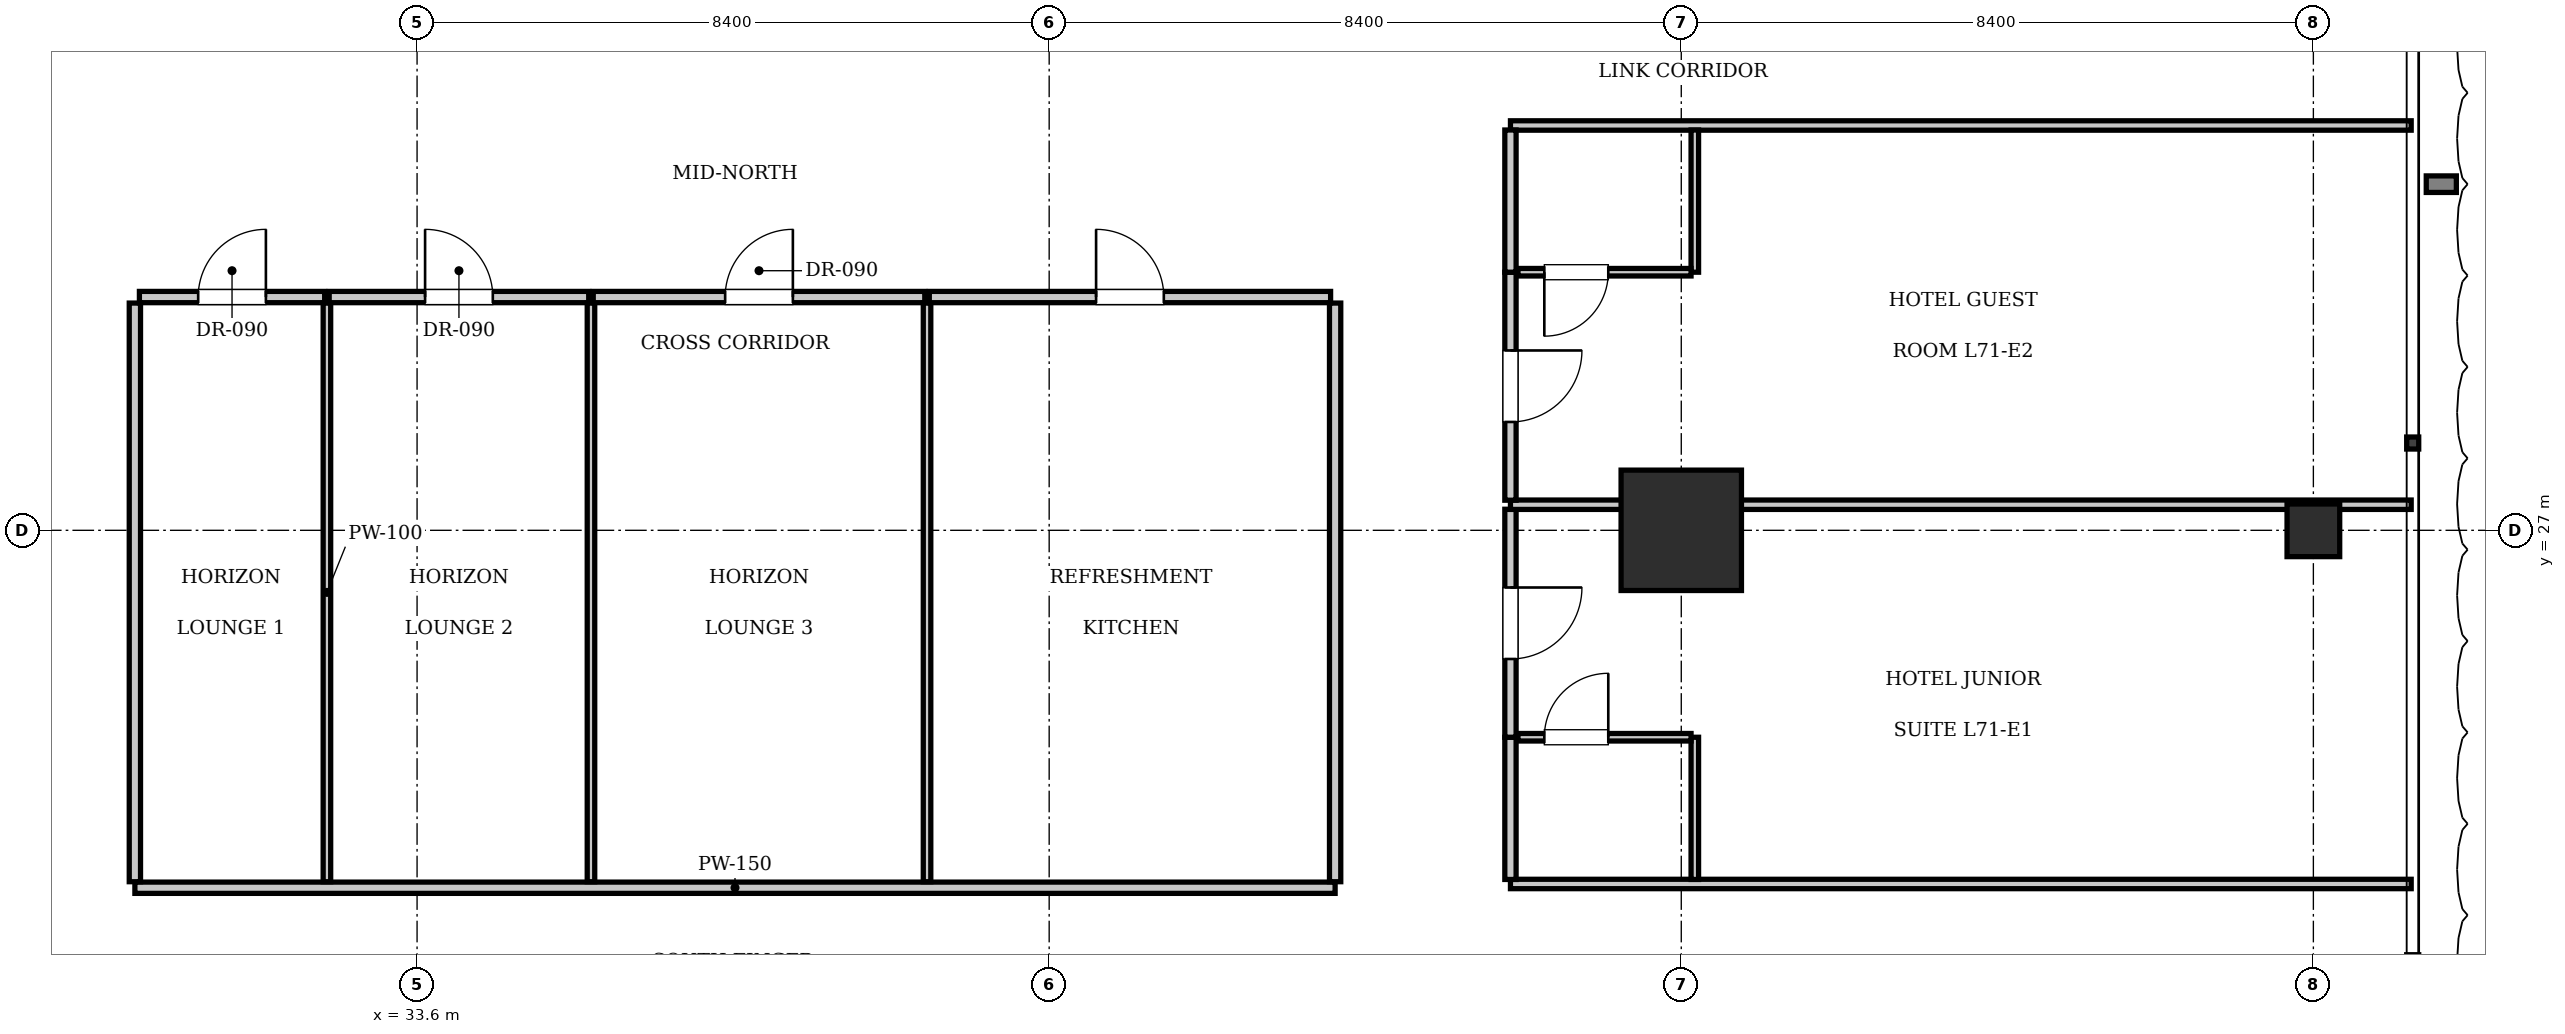
"""IFC4 building model, lengths in metres.
Left out: names, types, materials, properties, quantities, classifications, styles, units other than length and angle.
Written with IfcOpenShell. Run it as: python <this file> out.ifc"""

import sys

from ifc_helpers import new_model, si_unit, direction, frame, frame_2d, origin, origin_2d, place, context, subcontext, project, spatial, rectangle, extrude, element, fill, save


model = new_model("IFC4")
c1 = context("Model", 3, precision=1e-05, world=origin(), true_north=direction((0.0, 1.0)))
c2 = subcontext(c1, "Body", "Model", "MODEL_VIEW")
j1 = project(units=[si_unit("LENGTHUNIT", "METRE"), si_unit("PLANEANGLEUNIT", "RADIAN")], contexts=[c1])
p1 = place(None, origin())
s1 = spatial("IfcSite", under=j1, at=p1, CompositionType="ELEMENT")
p2 = place(p1, origin())
s2 = spatial("IfcBuilding", under=s1, at=p2, CompositionType="ELEMENT")
p3 = place(p2, frame((0.0, 0.0, 289.45)))
s3 = spatial("IfcBuildingStorey", under=s2, at=p3, CompositionType="ELEMENT", Elevation=289.45)
p4 = place(p3, frame((50.4, 27.0, 0.0), z_axis=(0.0, 0.0, 1.0), x_axis=(1.0, 0.0, 0.0)))
e1 = element("IfcColumn", 1, at=p4, inside=s3, PredefinedType="COLUMN", context=c2, shape_type="SweptSolid", body=[
    extrude(rectangle(XDim=1.6, YDim=1.6, at=origin_2d()), origin(), (0.0, 0.0, 1.0), 3.85),
])
p5 = place(p3, frame((58.8, 27.0, 0.0), z_axis=(0.0, 0.0, 1.0), x_axis=(1.0, 0.0, 0.0)))
e2 = element("IfcColumn", 2, at=p5, inside=s3, PredefinedType="COLUMN", context=c2, shape_type="SweptSolid", body=[
    extrude(rectangle(XDim=0.7, YDim=0.7, at=origin_2d()), origin(), (0.0, 0.0, 1.0), 3.85),
])
p6 = place(p3, frame((29.85, 22.25, 0.0), z_axis=(0.0, 0.0, 1.0), x_axis=(1.0, 0.0, 0.0)))
e3 = element("IfcWall", 3, at=p6, inside=s3, PredefinedType="PARTITIONING", context=c2, shape_type="SweptSolid", body=[
    extrude(rectangle(XDim=15.95, YDim=0.15, at=frame_2d((7.975, 0.0))), origin(), (0.0, 0.0, 1.0), 3.61),
])
for number, where, z_axis, x_axis in (
    (4, (29.85, 22.33, 0.0), (0.0, 0.0, 1.0), (0.0, 1.0, 0.0)),
    (5, (45.8, 22.33, 0.0), (0.0, 0.0, 1.0), (0.0, 1.0, 0.0)),
):
    element("IfcWall", number, at=place(p3, frame(where, z_axis=z_axis, x_axis=x_axis)), inside=s3, PredefinedType="PARTITIONING", context=c2, shape_type="SweptSolid", body=[
        extrude(rectangle(XDim=7.69, YDim=0.15, at=frame_2d((3.845, 0.0))), origin(), (0.0, 0.0, 1.0), 3.61),
    ])
p7 = place(p3, frame((29.91, 30.1, 0.0), z_axis=(0.0, 0.0, 1.0), x_axis=(1.0, 0.0, 0.0)))
e6 = element("IfcWall", 6, at=p7, inside=s3, PredefinedType="PARTITIONING", context=c2, shape_type="SweptSolid", body=[
    extrude(rectangle(XDim=2.462, YDim=0.15, at=frame_2d((1.231, 0.0))), origin(), (0.0, 0.0, 1.0), 3.61),
])
p8 = place(p7, frame((0.781, 0.0, 0.0)))
e7 = element("IfcOpeningElement", 7, at=p8, cuts=e6, PredefinedType="OPENING", context=c2, shape_type="SweptSolid", body=[
    extrude(rectangle(XDim=0.9, YDim=2.1, at=frame_2d((0.45, 1.05))), frame((0.0, 0.085, 0.0), z_axis=(0.0, -1.0, 0.0), x_axis=(1.0, 0.0, 0.0)), (0.0, 0.0, 1.0), 0.17),
])
p9 = place(p3, frame((32.402, 22.33, 0.0), z_axis=(0.0, 0.0, 1.0), x_axis=(0.0, 1.0, 0.0)))
e8 = element("IfcWall", 8, at=p9, inside=s3, PredefinedType="PARTITIONING", context=c2, shape_type="SweptSolid", body=[
    extrude(rectangle(XDim=7.69, YDim=0.1, at=frame_2d((3.845, 0.0))), origin(), (0.0, 0.0, 1.0), 3.61),
])
p10 = place(p3, frame((32.432, 30.1, 0.0), z_axis=(0.0, 0.0, 1.0), x_axis=(1.0, 0.0, 0.0)))
e9 = element("IfcWall", 9, at=p10, inside=s3, PredefinedType="PARTITIONING", context=c2, shape_type="SweptSolid", body=[
    extrude(rectangle(XDim=3.449, YDim=0.15, at=frame_2d((1.725, 0.0))), origin(), (0.0, 0.0, 1.0), 3.61),
])
p11 = place(p10, frame((1.274, 0.0, 0.0)))
e10 = element("IfcOpeningElement", 10, at=p11, cuts=e9, PredefinedType="OPENING", context=c2, shape_type="SweptSolid", body=[
    extrude(rectangle(XDim=0.9, YDim=2.1, at=frame_2d((0.45, 1.05))), frame((0.0, 0.085, 0.0), z_axis=(0.0, -1.0, 0.0), x_axis=(1.0, 0.0, 0.0)), (0.0, 0.0, 1.0), 0.17),
])
p12 = place(p3, frame((35.911, 22.33, 0.0), z_axis=(0.0, 0.0, 1.0), x_axis=(0.0, 1.0, 0.0)))
e11 = element("IfcWall", 11, at=p12, inside=s3, PredefinedType="PARTITIONING", context=c2, shape_type="SweptSolid", body=[
    extrude(rectangle(XDim=7.69, YDim=0.1, at=frame_2d((3.845, 0.0))), origin(), (0.0, 0.0, 1.0), 3.61),
])
p13 = place(p3, frame((35.941, 30.1, 0.0), z_axis=(0.0, 0.0, 1.0), x_axis=(1.0, 0.0, 0.0)))
e12 = element("IfcWall", 12, at=p13, inside=s3, PredefinedType="PARTITIONING", context=c2, shape_type="SweptSolid", body=[
    extrude(rectangle(XDim=4.406, YDim=0.15, at=frame_2d((2.203, 0.0))), origin(), (0.0, 0.0, 1.0), 3.61),
])
p14 = place(p13, frame((1.753, 0.0, 0.0)))
e13 = element("IfcOpeningElement", 13, at=p14, cuts=e12, PredefinedType="OPENING", context=c2, shape_type="SweptSolid", body=[
    extrude(rectangle(XDim=0.9, YDim=2.1, at=frame_2d((0.45, 1.05))), frame((0.0, 0.085, 0.0), z_axis=(0.0, -1.0, 0.0), x_axis=(1.0, 0.0, 0.0)), (0.0, 0.0, 1.0), 0.17),
])
p15 = place(p3, frame((40.377, 22.33, 0.0), z_axis=(0.0, 0.0, 1.0), x_axis=(0.0, 1.0, 0.0)))
e14 = element("IfcWall", 14, at=p15, inside=s3, PredefinedType="PARTITIONING", context=c2, shape_type="SweptSolid", body=[
    extrude(rectangle(XDim=7.69, YDim=0.1, at=frame_2d((3.845, 0.0))), origin(), (0.0, 0.0, 1.0), 3.61),
])
p16 = place(p3, frame((40.407, 30.1, 0.0), z_axis=(0.0, 0.0, 1.0), x_axis=(1.0, 0.0, 0.0)))
e15 = element("IfcWall", 15, at=p16, inside=s3, PredefinedType="PARTITIONING", context=c2, shape_type="SweptSolid", body=[
    extrude(rectangle(XDim=5.333, YDim=0.15, at=frame_2d((2.667, 0.0))), origin(), (0.0, 0.0, 1.0), 3.61),
])
p17 = place(p16, frame((2.217, 0.0, 0.0)))
e16 = element("IfcOpeningElement", 16, at=p17, cuts=e15, PredefinedType="OPENING", context=c2, shape_type="SweptSolid", body=[
    extrude(rectangle(XDim=0.9, YDim=2.1, at=frame_2d((0.45, 1.05))), frame((0.0, 0.085, 0.0), z_axis=(0.0, -1.0, 0.0), x_axis=(1.0, 0.0, 0.0)), (0.0, 0.0, 1.0), 0.17),
])
for number, where, z_axis, x_axis in (
    (17, (48.13, 22.3, 0.0), (0.0, 0.0, 1.0), (1.0, 0.0, 0.0)),
    (18, (48.13, 32.38, 0.0), (0.0, 0.0, 1.0), (1.0, 0.0, 0.0)),
):
    element("IfcWall", number, at=place(p3, frame(where, z_axis=z_axis, x_axis=x_axis)), inside=s3, PredefinedType="PARTITIONING", context=c2, shape_type="SweptSolid", body=[
        extrude(rectangle(XDim=11.97, YDim=0.125, at=frame_2d((5.985, 0.0))), origin(), (0.0, 0.0, 1.0), 3.61),
    ])
p18 = place(p3, frame((48.13, 22.36, 0.0), z_axis=(0.0, 0.0, 1.0), x_axis=(0.0, 1.0, 0.0)))
e19 = element("IfcWall", 19, at=p18, inside=s3, PredefinedType="PARTITIONING", context=c2, shape_type="SweptSolid", body=[
    extrude(rectangle(XDim=1.89, YDim=0.15, at=frame_2d((0.945, 0.0))), origin(), (0.0, 0.0, 1.0), 3.61),
])
p19 = place(p3, frame((48.13, 24.25, 0.0), z_axis=(0.0, 0.0, 1.0), x_axis=(0.0, 1.0, 0.0)))
e20 = element("IfcWall", 20, at=p19, inside=s3, PredefinedType="PARTITIONING", context=c2, shape_type="SweptSolid", body=[
    extrude(rectangle(XDim=3.03, YDim=0.15, at=frame_2d((1.515, 0.0))), origin(), (0.0, 0.0, 1.0), 3.61),
])
p20 = place(p19, frame((1.04, 0.0, 0.0)))
e21 = element("IfcOpeningElement", 21, at=p20, cuts=e20, PredefinedType="OPENING", context=c2, shape_type="SweptSolid", body=[
    extrude(rectangle(XDim=0.95, YDim=2.15, at=frame_2d((0.475, 1.075))), frame((0.0, 0.085, 0.0), z_axis=(0.0, -1.0, 0.0), x_axis=(1.0, 0.0, 0.0)), (0.0, 0.0, 1.0), 0.17),
])
p21 = place(p3, frame((50.58, 22.36, 0.0), z_axis=(0.0, 0.0, 1.0), x_axis=(0.0, 1.0, 0.0)))
e22 = element("IfcWall", 22, at=p21, inside=s3, PredefinedType="PARTITIONING", context=c2, shape_type="SweptSolid", body=[
    extrude(rectangle(XDim=1.89, YDim=0.1, at=frame_2d((0.945, 0.0))), origin(), (0.0, 0.0, 1.0), 3.61),
])
p22 = place(p3, frame((48.23, 24.25, 0.0), z_axis=(0.0, 0.0, 1.0), x_axis=(1.0, 0.0, 0.0)))
e23 = element("IfcWall", 23, at=p22, inside=s3, PredefinedType="PARTITIONING", context=c2, shape_type="SweptSolid", body=[
    extrude(rectangle(XDim=2.3, YDim=0.1, at=frame_2d((1.15, 0.0))), origin(), (0.0, 0.0, 1.0), 3.61),
])
p23 = place(p22, frame((0.35, 0.0, 0.0)))
e24 = element("IfcOpeningElement", 24, at=p23, cuts=e23, PredefinedType="OPENING", context=c2, shape_type="SweptSolid", body=[
    extrude(rectangle(XDim=0.85, YDim=2.1, at=frame_2d((0.425, 1.05))), frame((0.0, 0.06, 0.0), z_axis=(0.0, -1.0, 0.0), x_axis=(1.0, 0.0, 0.0)), (0.0, 0.0, 1.0), 0.12),
])
p24 = place(p3, frame((48.13, 27.34, 0.0), z_axis=(0.0, 0.0, 1.0), x_axis=(1.0, 0.0, 0.0)))
e25 = element("IfcWall", 25, at=p24, inside=s3, PredefinedType="PARTITIONING", context=c2, shape_type="SweptSolid", body=[
    extrude(rectangle(XDim=11.97, YDim=0.125, at=frame_2d((5.985, 0.0))), origin(), (0.0, 0.0, 1.0), 3.61),
])
p25 = place(p3, frame((48.13, 27.4, 0.0), z_axis=(0.0, 0.0, 1.0), x_axis=(0.0, 1.0, 0.0)))
e26 = element("IfcWall", 26, at=p25, inside=s3, PredefinedType="PARTITIONING", context=c2, shape_type="SweptSolid", body=[
    extrude(rectangle(XDim=3.03, YDim=0.15, at=frame_2d((1.515, 0.0))), origin(), (0.0, 0.0, 1.0), 3.61),
])
p26 = place(p25, frame((1.04, 0.0, 0.0)))
e27 = element("IfcOpeningElement", 27, at=p26, cuts=e26, PredefinedType="OPENING", context=c2, shape_type="SweptSolid", body=[
    extrude(rectangle(XDim=0.95, YDim=2.15, at=frame_2d((0.475, 1.075))), frame((0.0, 0.085, 0.0), z_axis=(0.0, -1.0, 0.0), x_axis=(1.0, 0.0, 0.0)), (0.0, 0.0, 1.0), 0.17),
])
p27 = place(p3, frame((48.13, 30.43, 0.0), z_axis=(0.0, 0.0, 1.0), x_axis=(0.0, 1.0, 0.0)))
e28 = element("IfcWall", 28, at=p27, inside=s3, PredefinedType="PARTITIONING", context=c2, shape_type="SweptSolid", body=[
    extrude(rectangle(XDim=1.89, YDim=0.15, at=frame_2d((0.945, 0.0))), origin(), (0.0, 0.0, 1.0), 3.61),
])
p28 = place(p3, frame((50.58, 30.43, 0.0), z_axis=(0.0, 0.0, 1.0), x_axis=(0.0, 1.0, 0.0)))
e29 = element("IfcWall", 29, at=p28, inside=s3, PredefinedType="PARTITIONING", context=c2, shape_type="SweptSolid", body=[
    extrude(rectangle(XDim=1.89, YDim=0.1, at=frame_2d((0.945, 0.0))), origin(), (0.0, 0.0, 1.0), 3.61),
])
p29 = place(p3, frame((48.23, 30.43, 0.0), z_axis=(0.0, 0.0, 1.0), x_axis=(1.0, 0.0, 0.0)))
e30 = element("IfcWall", 30, at=p29, inside=s3, PredefinedType="PARTITIONING", context=c2, shape_type="SweptSolid", body=[
    extrude(rectangle(XDim=2.3, YDim=0.1, at=frame_2d((1.15, 0.0))), origin(), (0.0, 0.0, 1.0), 3.61),
])
p30 = place(p29, frame((0.35, 0.0, 0.0)))
e31 = element("IfcOpeningElement", 31, at=p30, cuts=e30, PredefinedType="OPENING", context=c2, shape_type="SweptSolid", body=[
    extrude(rectangle(XDim=0.85, YDim=2.1, at=frame_2d((0.425, 1.05))), frame((0.0, 0.06, 0.0), z_axis=(0.0, -1.0, 0.0), x_axis=(1.0, 0.0, 0.0)), (0.0, 0.0, 1.0), 0.12),
])
p31 = place(p8, origin())
e32 = element("IfcDoor", 32, at=p31, inside=s3, OperationType="SINGLE_SWING_RIGHT", PredefinedType="DOOR", context=c2, shape_type="SweptSolid", body=[
    extrude(rectangle(XDim=0.9, YDim=2.1, at=frame_2d((0.45, 1.05))), frame((0.0, 0.025, 0.0), z_axis=(0.0, -1.0, 0.0), x_axis=(1.0, 0.0, 0.0)), (0.0, 0.0, 1.0), 0.05),
])
fill(e7, e32)
p32 = place(p11, origin())
e33 = element("IfcDoor", 33, at=p32, inside=s3, OperationType="SINGLE_SWING_LEFT", PredefinedType="DOOR", context=c2, shape_type="SweptSolid", body=[
    extrude(rectangle(XDim=0.9, YDim=2.1, at=frame_2d((0.45, 1.05))), frame((0.0, 0.025, 0.0), z_axis=(0.0, -1.0, 0.0), x_axis=(1.0, 0.0, 0.0)), (0.0, 0.0, 1.0), 0.05),
])
fill(e10, e33)
p33 = place(p14, origin())
e34 = element("IfcDoor", 34, at=p33, inside=s3, OperationType="SINGLE_SWING_RIGHT", PredefinedType="DOOR", context=c2, shape_type="SweptSolid", body=[
    extrude(rectangle(XDim=0.9, YDim=2.1, at=frame_2d((0.45, 1.05))), frame((0.0, 0.025, 0.0), z_axis=(0.0, -1.0, 0.0), x_axis=(1.0, 0.0, 0.0)), (0.0, 0.0, 1.0), 0.05),
])
fill(e13, e34)
p34 = place(p17, origin())
e35 = element("IfcDoor", 35, at=p34, inside=s3, OperationType="SINGLE_SWING_LEFT", PredefinedType="DOOR", context=c2, shape_type="SweptSolid", body=[
    extrude(rectangle(XDim=0.9, YDim=2.1, at=frame_2d((0.45, 1.05))), frame((0.0, 0.025, 0.0), z_axis=(0.0, -1.0, 0.0), x_axis=(1.0, 0.0, 0.0)), (0.0, 0.0, 1.0), 0.05),
])
fill(e16, e35)
p35 = place(p23, origin())
e36 = element("IfcDoor", 36, at=p35, inside=s3, OperationType="SINGLE_SWING_RIGHT", PredefinedType="DOOR", context=c2, shape_type="SweptSolid", body=[
    extrude(rectangle(XDim=0.85, YDim=2.1, at=frame_2d((0.425, 1.05))), frame((0.0, 0.025, 0.0), z_axis=(0.0, -1.0, 0.0), x_axis=(1.0, 0.0, 0.0)), (0.0, 0.0, 1.0), 0.05),
])
fill(e24, e36)
p36 = place(p20, frame((0.95, 0.0, 0.0), z_axis=(0.0, 0.0, 1.0), x_axis=(-1.0, 0.0, 0.0)))
e37 = element("IfcDoor", 37, at=p36, inside=s3, OperationType="SINGLE_SWING_LEFT", PredefinedType="DOOR", context=c2, shape_type="SweptSolid", body=[
    extrude(rectangle(XDim=0.95, YDim=2.15, at=frame_2d((0.475, 1.075))), frame((0.0, 0.025, 0.0), z_axis=(0.0, -1.0, 0.0), x_axis=(1.0, 0.0, 0.0)), (0.0, 0.0, 1.0), 0.05),
])
fill(e21, e37)
p37 = place(p30, frame((0.85, 0.0, 0.0), z_axis=(0.0, 0.0, 1.0), x_axis=(-1.0, 0.0, 0.0)))
e38 = element("IfcDoor", 38, at=p37, inside=s3, OperationType="SINGLE_SWING_RIGHT", PredefinedType="DOOR", context=c2, shape_type="SweptSolid", body=[
    extrude(rectangle(XDim=0.85, YDim=2.1, at=frame_2d((0.425, 1.05))), frame((0.0, 0.025, 0.0), z_axis=(0.0, -1.0, 0.0), x_axis=(1.0, 0.0, 0.0)), (0.0, 0.0, 1.0), 0.05),
])
fill(e31, e38)
p38 = place(p26, frame((0.95, 0.0, 0.0), z_axis=(0.0, 0.0, 1.0), x_axis=(-1.0, 0.0, 0.0)))
e39 = element("IfcDoor", 39, at=p38, inside=s3, OperationType="SINGLE_SWING_LEFT", PredefinedType="DOOR", context=c2, shape_type="SweptSolid", body=[
    extrude(rectangle(XDim=0.95, YDim=2.15, at=frame_2d((0.475, 1.075))), frame((0.0, 0.025, 0.0), z_axis=(0.0, -1.0, 0.0), x_axis=(1.0, 0.0, 0.0)), (0.0, 0.0, 1.0), 0.05),
])
fill(e27, e39)
save(model, sys.argv[1])
